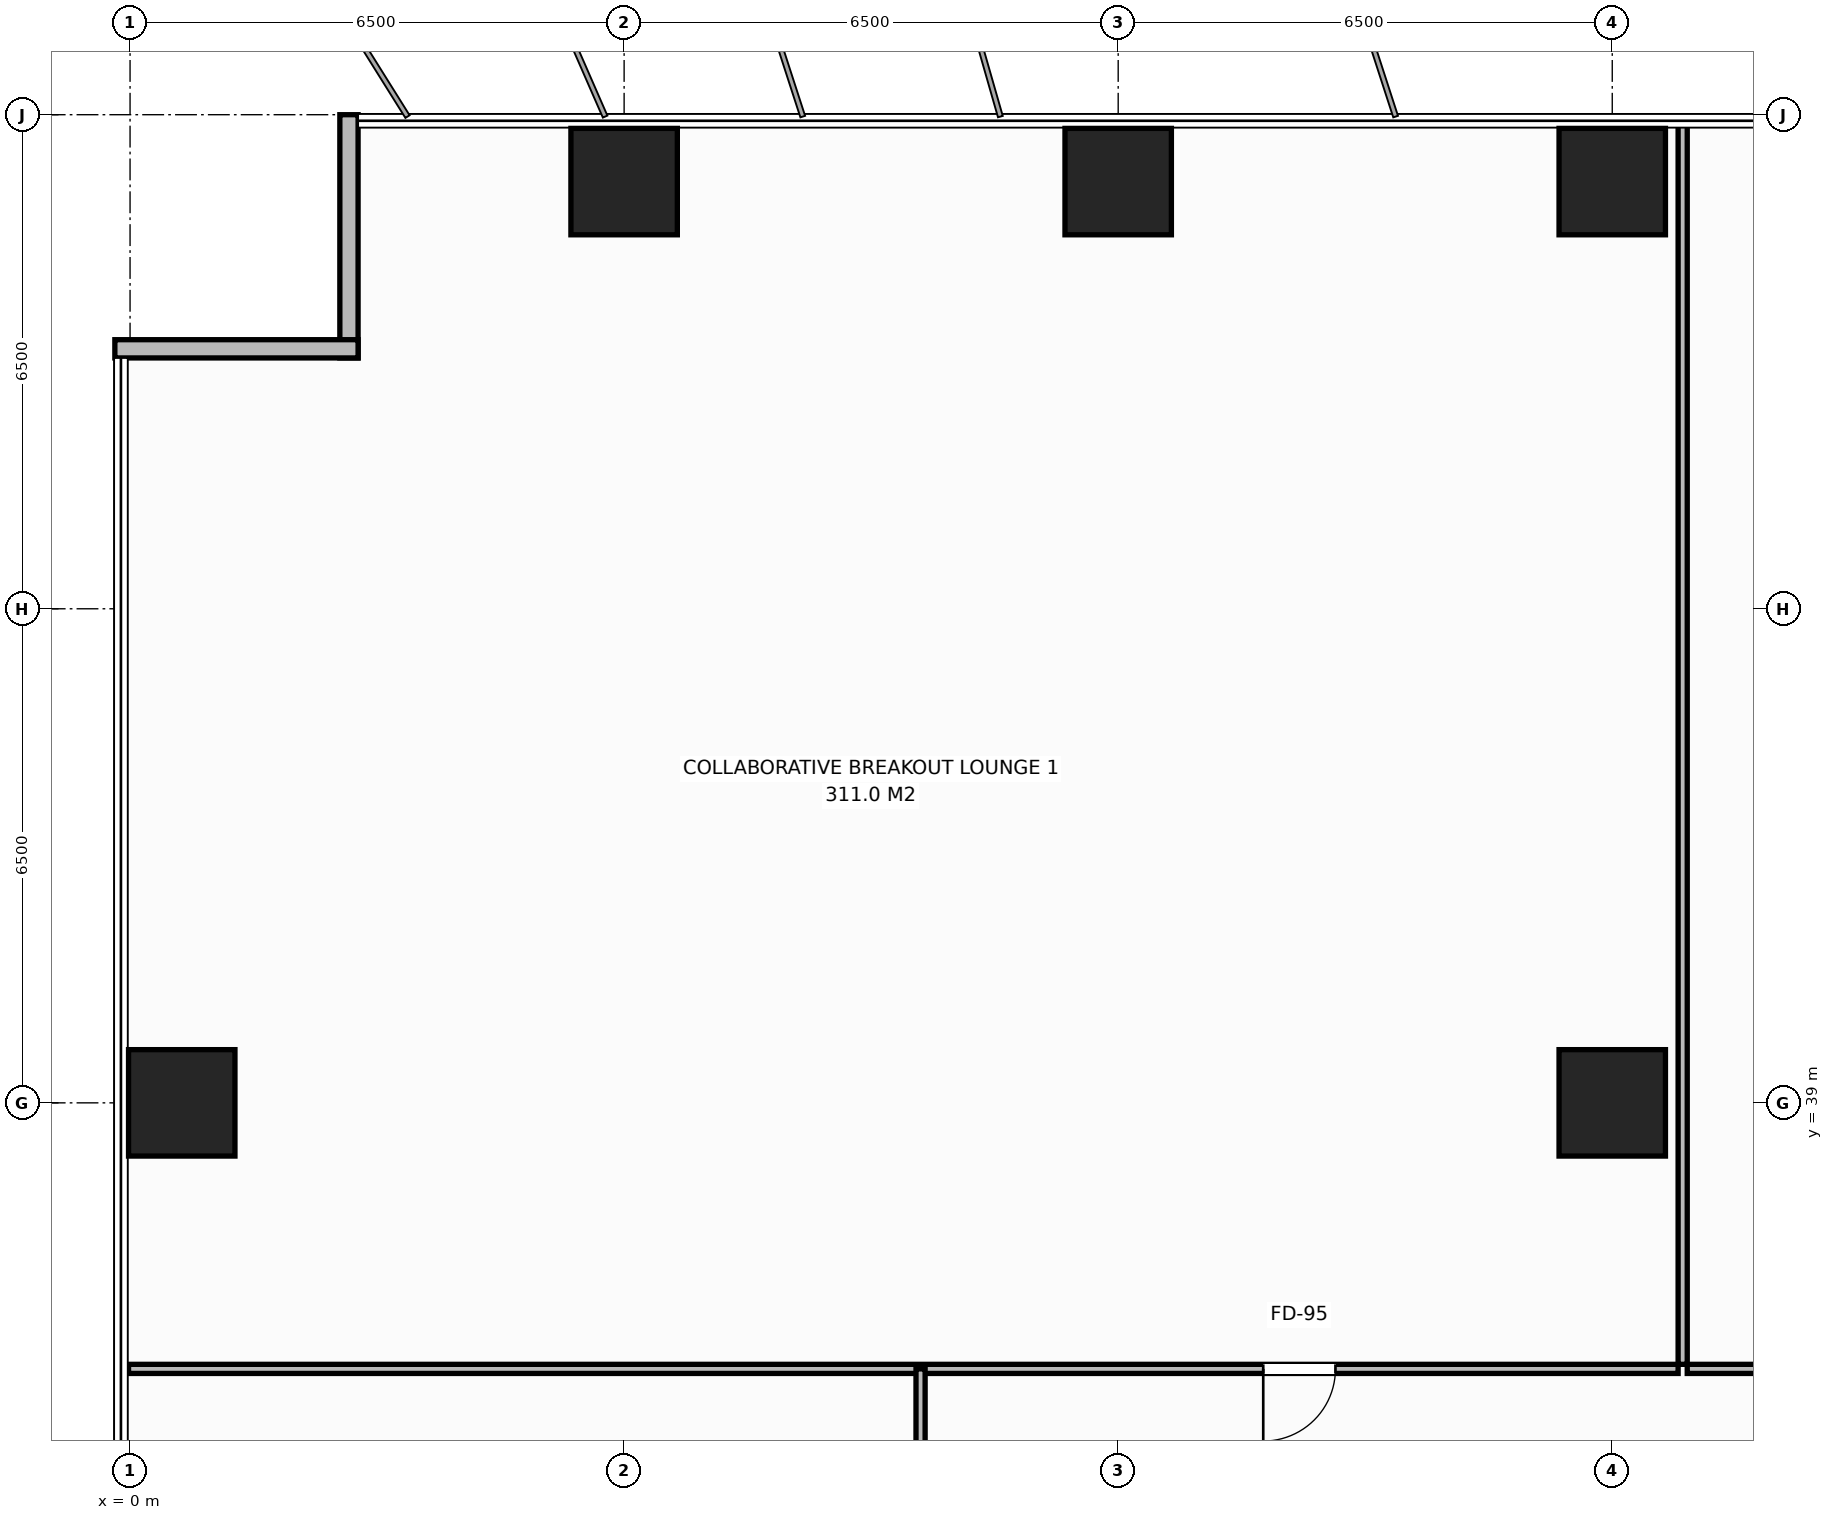
"""IFC4 building model, lengths in metres.
Left out: names, types, materials, properties, quantities, classifications, styles, units other than length and angle.
Written with IfcOpenShell. Run it as: python <this file> out.ifc"""

import sys

from ifc_helpers import new_model, si_unit, direction, frame, frame_2d, origin, origin_2d, place, context, subcontext, project, spatial, rectangle, extrude, element, fill, save


model = new_model("IFC4")
c1 = context("Model", 3, precision=1e-05, world=origin(), true_north=direction((0.0, 1.0)))
c2 = subcontext(c1, "Body", "Model", "MODEL_VIEW")
j1 = project(units=[si_unit("LENGTHUNIT", "METRE"), si_unit("PLANEANGLEUNIT", "RADIAN")], contexts=[c1])
p1 = place(None, origin())
s1 = spatial("IfcSite", under=j1, at=p1, CompositionType="ELEMENT")
p2 = place(p1, origin())
s2 = spatial("IfcBuilding", under=s1, at=p2, CompositionType="ELEMENT")
p3 = place(p2, frame((0.0, 0.0, 39.2)))
s3 = spatial("IfcBuildingStorey", under=s2, at=p3, CompositionType="ELEMENT", Elevation=39.2)
for number, where, z_axis, x_axis in (
    (1, (19.5, 39.0, 0.0), (0.0, 0.0, 1.0), (1.0, 0.0, 0.0)),
    (2, (6.5, 51.12, 0.0), (0.0, 0.0, 1.0), (1.0, 0.0, 0.0)),
    (3, (13.0, 51.12, 0.0), (0.0, 0.0, 1.0), (1.0, 0.0, 0.0)),
    (4, (19.5, 51.12, 0.0), (0.0, 0.0, 1.0), (1.0, 0.0, 0.0)),
    (5, (0.68, 39.0, 0.0), (0.0, 0.0, 1.0), (1.0, 0.0, 0.0)),
):
    element("IfcColumn", number, at=place(p3, frame(where, z_axis=z_axis, x_axis=x_axis)), inside=s3, PredefinedType="COLUMN", context=c2, shape_type="SweptSolid", body=[
        extrude(rectangle(XDim=1.4, YDim=1.4, at=origin_2d()), origin(), (0.0, 0.0, 1.0), 3.8),
    ])
for number, where, z_axis, x_axis in (
    (6, (2.88, 48.8, 0.0), (0.0, 0.0, 1.0), (0.0, 1.0, 0.0)),
    (7, (-0.2, 48.92, 0.0), (0.0, 0.0, 1.0), (1.0, 0.0, 0.0)),
):
    element("IfcWall", number, at=place(p3, frame(where, z_axis=z_axis, x_axis=x_axis)), inside=s3, PredefinedType="STANDARD", context=c2, shape_type="SweptSolid", body=[
        extrude(rectangle(XDim=3.2, YDim=0.24, at=frame_2d((1.6, 0.0))), origin(), (0.0, 0.0, 1.0), 3.55),
    ])
p4 = place(p3, frame((20.427, 35.56, 0.0), z_axis=(0.0, 0.0, 1.0), x_axis=(0.0, 1.0, 0.0)))
e8 = element("IfcWall", 8, at=p4, inside=s3, PredefinedType="PARTITIONING", context=c2, shape_type="SweptSolid", body=[
    extrude(rectangle(XDim=16.42, YDim=0.12, at=frame_2d((8.21, 0.0))), origin(), (0.0, 0.0, 1.0), 3.55),
])
p5 = place(p3, frame((-0.02, 35.5, 0.0), z_axis=(0.0, 0.0, 1.0), x_axis=(1.0, 0.0, 0.0)))
e9 = element("IfcWall", 9, at=p5, inside=s3, PredefinedType="PARTITIONING", context=c2, shape_type="SweptSolid", body=[
    extrude(rectangle(XDim=20.386, YDim=0.12, at=frame_2d((10.193, 0.0))), origin(), (0.0, 0.0, 1.0), 3.55),
])
p6 = place(p5, frame((14.928, 0.0, 0.0)))
e10 = element("IfcOpeningElement", 10, at=p6, cuts=e9, PredefinedType="OPENING", context=c2, shape_type="SweptSolid", body=[
    extrude(rectangle(XDim=0.95, YDim=2.15, at=frame_2d((0.475, 1.075))), frame((0.0, 0.07, 0.0), z_axis=(0.0, -1.0, 0.0), x_axis=(1.0, 0.0, 0.0)), (0.0, 0.0, 1.0), 0.14),
])
p7 = place(p3, frame((20.487, 35.5, 0.0), z_axis=(0.0, 0.0, 1.0), x_axis=(1.0, 0.0, 0.0)))
e11 = element("IfcWall", 11, at=p7, inside=s3, PredefinedType="PARTITIONING", context=c2, shape_type="SweptSolid", body=[
    extrude(rectangle(XDim=14.856, YDim=0.12, at=frame_2d((7.428, 0.0))), origin(), (0.0, 0.0, 1.0), 3.55),
])
p8 = place(p7, frame((6.953, 0.0, 0.0)))
e12 = element("IfcOpeningElement", 12, at=p8, cuts=e11, PredefinedType="OPENING", context=c2, shape_type="SweptSolid", body=[
    extrude(rectangle(XDim=0.95, YDim=2.15, at=frame_2d((0.475, 1.075))), frame((0.0, 0.07, 0.0), z_axis=(0.0, -1.0, 0.0), x_axis=(1.0, 0.0, 0.0)), (0.0, 0.0, 1.0), 0.14),
])
p9 = place(p3, frame((10.4, 26.0, 0.0), z_axis=(0.0, 0.0, 1.0), x_axis=(0.0, 1.0, 0.0)))
e13 = element("IfcWall", 13, at=p9, inside=s3, PredefinedType="PARTITIONING", context=c2, shape_type="SweptSolid", body=[
    extrude(rectangle(XDim=9.5, YDim=0.12, at=frame_2d((4.75, 0.0))), origin(), (0.0, 0.0, 1.0), 3.55),
])
p10 = place(p9, frame((3.225, 0.0, 0.0)))
e14 = element("IfcOpeningElement", 14, at=p10, cuts=e13, PredefinedType="OPENING", context=c2, shape_type="SweptSolid", body=[
    extrude(rectangle(XDim=0.95, YDim=2.15, at=frame_2d((0.475, 1.075))), frame((0.0, 0.07, 0.0), z_axis=(0.0, -1.0, 0.0), x_axis=(1.0, 0.0, 0.0)), (0.0, 0.0, 1.0), 0.14),
])
p11 = place(p6, origin())
e15 = element("IfcDoor", 15, at=p11, inside=s3, OperationType="SINGLE_SWING_RIGHT", PredefinedType="DOOR", context=c2, shape_type="SweptSolid", body=[
    extrude(rectangle(XDim=0.95, YDim=2.15, at=frame_2d((0.475, 1.075))), frame((0.0, 0.025, 0.0), z_axis=(0.0, -1.0, 0.0), x_axis=(1.0, 0.0, 0.0)), (0.0, 0.0, 1.0), 0.05),
])
fill(e10, e15)
save(model, sys.argv[1])
